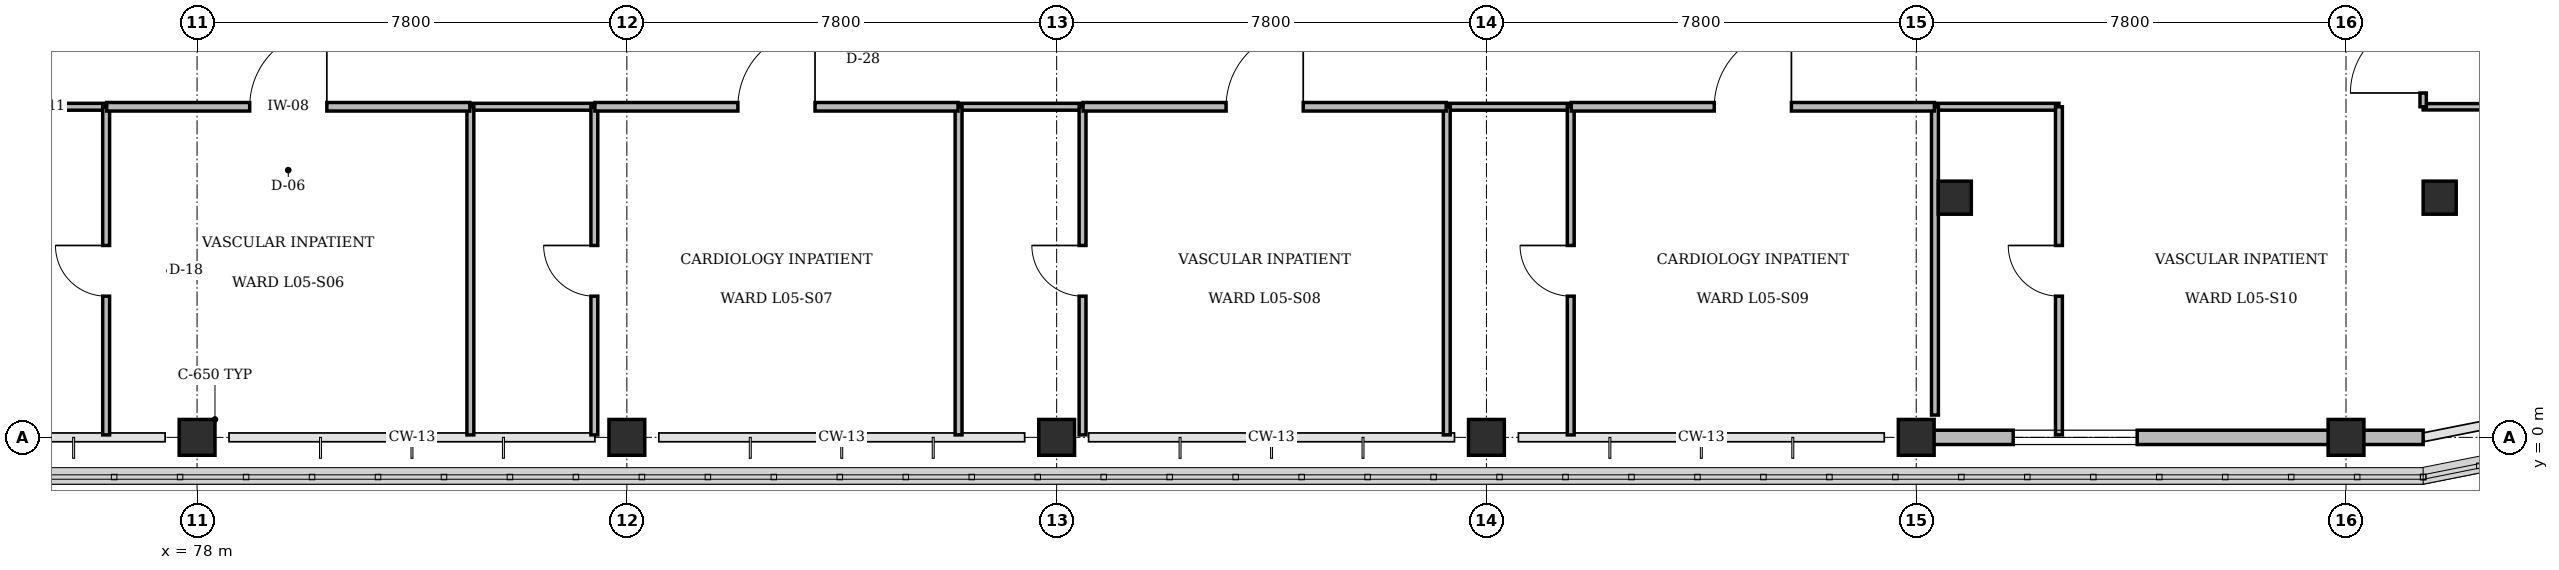
"""IFC4 building model, lengths in metres.
Left out: names, types, materials, properties, quantities, classifications, styles, units other than length and angle.
Written with IfcOpenShell. Run it as: python <this file> out.ifc"""

import sys

from ifc_helpers import new_model, si_unit, direction, frame, frame_2d, origin, origin_2d, place, context, subcontext, project, spatial, rectangle, circle, extrude, element, fill, save


model = new_model("IFC4")
c1 = context("Model", 3, precision=1e-05, world=origin(), true_north=direction((0.0, 1.0)))
c2 = subcontext(c1, "Body", "Model", "MODEL_VIEW")
j1 = project(units=[si_unit("LENGTHUNIT", "METRE"), si_unit("PLANEANGLEUNIT", "RADIAN")], contexts=[c1])
p1 = place(None, origin())
s1 = spatial("IfcSite", under=j1, at=p1, CompositionType="ELEMENT")
p2 = place(p1, origin())
s2 = spatial("IfcBuilding", under=s1, at=p2, CompositionType="ELEMENT")
p3 = place(p2, frame((0.0, 0.0, 22.2)))
s3 = spatial("IfcBuildingStorey", under=s2, at=p3, CompositionType="ELEMENT", Elevation=22.2)
for number, where, z_axis, x_axis in (
    (1, (78.0, 0.0, 0.0), (0.0, 0.0, 1.0), (1.0, 0.0, 0.0)),
    (2, (85.8, 0.0, 0.0), (0.0, 0.0, 1.0), (1.0, 0.0, 0.0)),
    (3, (93.6, 0.0, 0.0), (0.0, 0.0, 1.0), (1.0, 0.0, 0.0)),
    (4, (101.4, 0.0, 0.0), (0.0, 0.0, 1.0), (1.0, 0.0, 0.0)),
    (5, (109.2, 0.0, 0.0), (0.0, 0.0, 1.0), (1.0, 0.0, 0.0)),
    (6, (117.0, 0.0, 0.0), (0.0, 0.0, 1.0), (1.0, 0.0, 0.0)),
):
    element("IfcColumn", number, at=place(p3, frame(where, z_axis=z_axis, x_axis=x_axis)), inside=s3, PredefinedType="COLUMN", context=c2, shape_type="SweptSolid", body=[
        extrude(rectangle(XDim=0.65, YDim=0.65, at=origin_2d()), origin(), (0.0, 0.0, 1.0), 4.2),
    ])
for number, where, z_axis, x_axis in (
    (7, (118.7, 4.35, 0.0), (0.0, 0.0, 1.0), (1.0, 0.0, 0.0)),
    (8, (109.9, 4.35, 0.0), (0.0, 0.0, 1.0), (1.0, 0.0, 0.0)),
):
    element("IfcColumn", number, at=place(p3, frame(where, z_axis=z_axis, x_axis=x_axis)), inside=s3, PredefinedType="PILASTER", context=c2, shape_type="SweptSolid", body=[
        extrude(circle(Radius=0.3, at=origin_2d()), origin(), (0.0, 0.0, 1.0), 4.2),
    ])
p4 = place(p3, frame((118.4, 0.0, 0.0), z_axis=(0.0, 0.0, 1.0), x_axis=(-1.0, 0.0, 0.0)))
e9 = element("IfcWall", 9, at=p4, inside=s3, PredefinedType="STANDARD", context=c2, shape_type="SweptSolid", body=[
    extrude(rectangle(XDim=8.91, YDim=0.26, at=frame_2d((4.455, 0.0))), origin(), (0.0, 0.0, 1.0), 2.805),
])
p5 = place(p4, frame((5.19, 0.0, 0.85)))
e10 = element("IfcOpeningElement", 10, at=p5, cuts=e9, PredefinedType="OPENING", context=c2, shape_type="SweptSolid", body=[
    extrude(rectangle(XDim=2.25, YDim=1.45, at=frame_2d((1.125, 0.725))), frame((0.0, 0.14, 0.0), z_axis=(0.0, -1.0, 0.0), x_axis=(1.0, 0.0, 0.0)), (0.0, 0.0, 1.0), 0.28),
])
p6 = place(p3, frame((74.1, 6.0, 0.0), z_axis=(0.0, 0.0, 1.0), x_axis=(1.0, 0.0, 0.0)))
e11 = element("IfcWall", 11, at=p6, inside=s3, PredefinedType="PARTITIONING", context=c2, shape_type="SweptSolid", body=[
    extrude(rectangle(XDim=2.25, YDim=0.125, at=frame_2d((1.125, 0.0))), origin(), (0.0, 0.0, 1.0), 3.9),
])
p7 = place(p3, frame((76.35, 0.045, 0.0), z_axis=(0.0, 0.0, 1.0), x_axis=(0.0, 1.0, 0.0)))
e12 = element("IfcWall", 12, at=p7, inside=s3, PredefinedType="PARTITIONING", context=c2, shape_type="SweptSolid", body=[
    extrude(rectangle(XDim=5.955, YDim=0.125, at=frame_2d((2.978, 0.0))), origin(), (0.0, 0.0, 1.0), 3.9),
])
p8 = place(p7, frame((2.518, 0.0, 0.0)))
e13 = element("IfcOpeningElement", 13, at=p8, cuts=e12, PredefinedType="OPENING", context=c2, shape_type="SweptSolid", body=[
    extrude(rectangle(XDim=0.92, YDim=2.1, at=frame_2d((0.46, 1.05))), frame((0.0, 0.073, 0.0), z_axis=(0.0, -1.0, 0.0), x_axis=(1.0, 0.0, 0.0)), (0.0, 0.0, 1.0), 0.145),
])
p9 = place(p3, frame((82.96, 6.0, 0.0), z_axis=(0.0, 0.0, 1.0), x_axis=(1.0, 0.0, 0.0)))
e14 = element("IfcWall", 14, at=p9, inside=s3, PredefinedType="PARTITIONING", context=c2, shape_type="SweptSolid", body=[
    extrude(rectangle(XDim=2.25, YDim=0.125, at=frame_2d((1.125, 0.0))), origin(), (0.0, 0.0, 1.0), 3.9),
])
p10 = place(p3, frame((82.96, 0.045, 0.0), z_axis=(0.0, 0.0, 1.0), x_axis=(0.0, 1.0, 0.0)))
e15 = element("IfcWall", 15, at=p10, inside=s3, PredefinedType="PARTITIONING", context=c2, shape_type="SweptSolid", body=[
    extrude(rectangle(XDim=5.955, YDim=0.125, at=frame_2d((2.978, 0.0))), origin(), (0.0, 0.0, 1.0), 3.9),
])
p11 = place(p3, frame((85.21, 0.045, 0.0), z_axis=(0.0, 0.0, 1.0), x_axis=(0.0, 1.0, 0.0)))
e16 = element("IfcWall", 16, at=p11, inside=s3, PredefinedType="PARTITIONING", context=c2, shape_type="SweptSolid", body=[
    extrude(rectangle(XDim=5.955, YDim=0.125, at=frame_2d((2.978, 0.0))), origin(), (0.0, 0.0, 1.0), 3.9),
])
p12 = place(p11, frame((2.518, 0.0, 0.0)))
e17 = element("IfcOpeningElement", 17, at=p12, cuts=e16, PredefinedType="OPENING", context=c2, shape_type="SweptSolid", body=[
    extrude(rectangle(XDim=0.92, YDim=2.1, at=frame_2d((0.46, 1.05))), frame((0.0, 0.073, 0.0), z_axis=(0.0, -1.0, 0.0), x_axis=(1.0, 0.0, 0.0)), (0.0, 0.0, 1.0), 0.145),
])
p13 = place(p3, frame((91.82, 6.0, 0.0), z_axis=(0.0, 0.0, 1.0), x_axis=(1.0, 0.0, 0.0)))
e18 = element("IfcWall", 18, at=p13, inside=s3, PredefinedType="PARTITIONING", context=c2, shape_type="SweptSolid", body=[
    extrude(rectangle(XDim=2.25, YDim=0.125, at=frame_2d((1.125, 0.0))), origin(), (0.0, 0.0, 1.0), 3.9),
])
p14 = place(p3, frame((91.82, 0.045, 0.0), z_axis=(0.0, 0.0, 1.0), x_axis=(0.0, 1.0, 0.0)))
e19 = element("IfcWall", 19, at=p14, inside=s3, PredefinedType="PARTITIONING", context=c2, shape_type="SweptSolid", body=[
    extrude(rectangle(XDim=5.955, YDim=0.125, at=frame_2d((2.978, 0.0))), origin(), (0.0, 0.0, 1.0), 3.9),
])
p15 = place(p3, frame((94.07, 0.045, 0.0), z_axis=(0.0, 0.0, 1.0), x_axis=(0.0, 1.0, 0.0)))
e20 = element("IfcWall", 20, at=p15, inside=s3, PredefinedType="PARTITIONING", context=c2, shape_type="SweptSolid", body=[
    extrude(rectangle(XDim=5.955, YDim=0.125, at=frame_2d((2.978, 0.0))), origin(), (0.0, 0.0, 1.0), 3.27),
])
p16 = place(p15, frame((2.518, 0.0, 0.0)))
e21 = element("IfcOpeningElement", 21, at=p16, cuts=e20, PredefinedType="OPENING", context=c2, shape_type="SweptSolid", body=[
    extrude(rectangle(XDim=0.92, YDim=2.1, at=frame_2d((0.46, 1.05))), frame((0.0, 0.073, 0.0), z_axis=(0.0, -1.0, 0.0), x_axis=(1.0, 0.0, 0.0)), (0.0, 0.0, 1.0), 0.145),
])
p17 = place(p3, frame((100.68, 6.0, 0.0), z_axis=(0.0, 0.0, 1.0), x_axis=(1.0, 0.0, 0.0)))
e22 = element("IfcWall", 22, at=p17, inside=s3, PredefinedType="PARTITIONING", context=c2, shape_type="SweptSolid", body=[
    extrude(rectangle(XDim=2.25, YDim=0.125, at=frame_2d((1.125, 0.0))), origin(), (0.0, 0.0, 1.0), 3.9),
])
p18 = place(p3, frame((100.68, 0.045, 0.0), z_axis=(0.0, 0.0, 1.0), x_axis=(0.0, 1.0, 0.0)))
e23 = element("IfcWall", 23, at=p18, inside=s3, PredefinedType="PARTITIONING", context=c2, shape_type="SweptSolid", body=[
    extrude(rectangle(XDim=5.955, YDim=0.125, at=frame_2d((2.978, 0.0))), origin(), (0.0, 0.0, 1.0), 3.9),
])
p19 = place(p3, frame((102.93, 0.045, 0.0), z_axis=(0.0, 0.0, 1.0), x_axis=(0.0, 1.0, 0.0)))
e24 = element("IfcWall", 24, at=p19, inside=s3, PredefinedType="PARTITIONING", context=c2, shape_type="SweptSolid", body=[
    extrude(rectangle(XDim=5.955, YDim=0.125, at=frame_2d((2.978, 0.0))), origin(), (0.0, 0.0, 1.0), 3.9),
])
p20 = place(p19, frame((2.518, 0.0, 0.0)))
e25 = element("IfcOpeningElement", 25, at=p20, cuts=e24, PredefinedType="OPENING", context=c2, shape_type="SweptSolid", body=[
    extrude(rectangle(XDim=0.92, YDim=2.1, at=frame_2d((0.46, 1.05))), frame((0.0, 0.073, 0.0), z_axis=(0.0, -1.0, 0.0), x_axis=(1.0, 0.0, 0.0)), (0.0, 0.0, 1.0), 0.145),
])
p21 = place(p3, frame((109.54, 6.0, 0.0), z_axis=(0.0, 0.0, 1.0), x_axis=(1.0, 0.0, 0.0)))
e26 = element("IfcWall", 26, at=p21, inside=s3, PredefinedType="PARTITIONING", context=c2, shape_type="SweptSolid", body=[
    extrude(rectangle(XDim=2.25, YDim=0.125, at=frame_2d((1.125, 0.0))), origin(), (0.0, 0.0, 1.0), 3.9),
])
p22 = place(p3, frame((109.54, 0.405, 0.0), z_axis=(0.0, 0.0, 1.0), x_axis=(0.0, 1.0, 0.0)))
e27 = element("IfcWall", 27, at=p22, inside=s3, PredefinedType="PARTITIONING", context=c2, shape_type="SweptSolid", body=[
    extrude(rectangle(XDim=5.595, YDim=0.125, at=frame_2d((2.797, 0.0))), origin(), (0.0, 0.0, 1.0), 3.27),
])
p23 = place(p3, frame((111.79, 0.045, 0.0), z_axis=(0.0, 0.0, 1.0), x_axis=(0.0, 1.0, 0.0)))
e28 = element("IfcWall", 28, at=p23, inside=s3, PredefinedType="PARTITIONING", context=c2, shape_type="SweptSolid", body=[
    extrude(rectangle(XDim=5.955, YDim=0.125, at=frame_2d((2.978, 0.0))), origin(), (0.0, 0.0, 1.0), 3.9),
])
p24 = place(p23, frame((2.518, 0.0, 0.0)))
e29 = element("IfcOpeningElement", 29, at=p24, cuts=e28, PredefinedType="OPENING", context=c2, shape_type="SweptSolid", body=[
    extrude(rectangle(XDim=0.92, YDim=2.1, at=frame_2d((0.46, 1.05))), frame((0.0, 0.073, 0.0), z_axis=(0.0, -1.0, 0.0), x_axis=(1.0, 0.0, 0.0)), (0.0, 0.0, 1.0), 0.145),
])
p25 = place(p3, frame((118.4, 6.0, 0.0), z_axis=(0.0, 0.0, 1.0), x_axis=(1.0, 0.0, 0.0)))
e30 = element("IfcWall", 30, at=p25, inside=s3, PredefinedType="PARTITIONING", context=c2, shape_type="SweptSolid", body=[
    extrude(rectangle(XDim=12.1, YDim=0.115, at=frame_2d((6.05, 0.0))), origin(), (0.0, 0.0, 1.0), 3.9),
])
p26 = place(p3, frame((118.4, 6.0, 0.0), z_axis=(0.0, 0.0, 1.0), x_axis=(0.0, 1.0, 0.0)))
e31 = element("IfcWall", 31, at=p26, inside=s3, PredefinedType="PARTITIONING", context=c2, shape_type="SweptSolid", body=[
    extrude(rectangle(XDim=13.2, YDim=0.115, at=frame_2d((6.6, 0.0))), origin(), (0.0, 0.0, 1.0), 3.9),
])
p27 = place(p26, frame((0.25, 0.0, 0.0)))
e32 = element("IfcOpeningElement", 32, at=p27, cuts=e31, PredefinedType="OPENING", context=c2, shape_type="SweptSolid", body=[
    extrude(rectangle(XDim=1.32, YDim=2.15, at=frame_2d((0.66, 1.075))), frame((0.0, 0.067, 0.0), z_axis=(0.0, -1.0, 0.0), x_axis=(1.0, 0.0, 0.0)), (0.0, 0.0, 1.0), 0.135),
])
p28 = place(p3, frame((76.36, 6.0, 0.0), z_axis=(0.0, 0.0, 1.0), x_axis=(1.0, 0.0, 0.0)))
e33 = element("IfcWall", 33, at=p28, inside=s3, PredefinedType="PARTITIONING", context=c2, shape_type="SweptSolid", body=[
    extrude(rectangle(XDim=6.59, YDim=0.155, at=frame_2d((3.295, 0.0))), origin(), (0.0, 0.0, 1.0), 3.9),
])
p29 = place(p28, frame((2.595, 0.0, 0.0)))
e34 = element("IfcOpeningElement", 34, at=p29, cuts=e33, PredefinedType="OPENING", context=c2, shape_type="SweptSolid", body=[
    extrude(rectangle(XDim=1.4, YDim=2.2, at=frame_2d((0.7, 1.1))), frame((0.0, 0.087, 0.0), z_axis=(0.0, -1.0, 0.0), x_axis=(1.0, 0.0, 0.0)), (0.0, 0.0, 1.0), 0.175),
])
p30 = place(p3, frame((85.22, 6.0, 0.0), z_axis=(0.0, 0.0, 1.0), x_axis=(1.0, 0.0, 0.0)))
e35 = element("IfcWall", 35, at=p30, inside=s3, PredefinedType="PARTITIONING", context=c2, shape_type="SweptSolid", body=[
    extrude(rectangle(XDim=6.59, YDim=0.155, at=frame_2d((3.295, 0.0))), origin(), (0.0, 0.0, 1.0), 3.9),
])
p31 = place(p30, frame((2.595, 0.0, 0.0)))
e36 = element("IfcOpeningElement", 36, at=p31, cuts=e35, PredefinedType="OPENING", context=c2, shape_type="SweptSolid", body=[
    extrude(rectangle(XDim=1.4, YDim=2.2, at=frame_2d((0.7, 1.1))), frame((0.0, 0.087, 0.0), z_axis=(0.0, -1.0, 0.0), x_axis=(1.0, 0.0, 0.0)), (0.0, 0.0, 1.0), 0.175),
])
p32 = place(p3, frame((94.08, 6.0, 0.0), z_axis=(0.0, 0.0, 1.0), x_axis=(1.0, 0.0, 0.0)))
e37 = element("IfcWall", 37, at=p32, inside=s3, PredefinedType="PARTITIONING", context=c2, shape_type="SweptSolid", body=[
    extrude(rectangle(XDim=6.59, YDim=0.155, at=frame_2d((3.295, 0.0))), origin(), (0.0, 0.0, 1.0), 3.9),
])
p33 = place(p32, frame((2.595, 0.0, 0.0)))
e38 = element("IfcOpeningElement", 38, at=p33, cuts=e37, PredefinedType="OPENING", context=c2, shape_type="SweptSolid", body=[
    extrude(rectangle(XDim=1.4, YDim=2.2, at=frame_2d((0.7, 1.1))), frame((0.0, 0.087, 0.0), z_axis=(0.0, -1.0, 0.0), x_axis=(1.0, 0.0, 0.0)), (0.0, 0.0, 1.0), 0.175),
])
p34 = place(p3, frame((102.94, 6.0, 0.0), z_axis=(0.0, 0.0, 1.0), x_axis=(1.0, 0.0, 0.0)))
e39 = element("IfcWall", 39, at=p34, inside=s3, PredefinedType="PARTITIONING", context=c2, shape_type="SweptSolid", body=[
    extrude(rectangle(XDim=6.59, YDim=0.155, at=frame_2d((3.295, 0.0))), origin(), (0.0, 0.0, 1.0), 3.9),
])
p35 = place(p34, frame((2.595, 0.0, 0.0)))
e40 = element("IfcOpeningElement", 40, at=p35, cuts=e39, PredefinedType="OPENING", context=c2, shape_type="SweptSolid", body=[
    extrude(rectangle(XDim=1.4, YDim=2.2, at=frame_2d((0.7, 1.1))), frame((0.0, 0.087, 0.0), z_axis=(0.0, -1.0, 0.0), x_axis=(1.0, 0.0, 0.0)), (0.0, 0.0, 1.0), 0.175),
])
p36 = place(p5, origin())
e41 = element("IfcWindow", 41, at=p36, inside=s3, PartitioningType="SINGLE_PANEL", PredefinedType="WINDOW", context=c2, shape_type="SweptSolid", body=[
    extrude(rectangle(XDim=2.25, YDim=1.45, at=frame_2d((1.125, 0.725))), frame((0.0, 0.03, 0.0), z_axis=(0.0, -1.0, 0.0), x_axis=(1.0, 0.0, 0.0)), (0.0, 0.0, 1.0), 0.06),
])
fill(e10, e41)
p37 = place(p8, origin())
e42 = element("IfcDoor", 42, at=p37, inside=s3, OperationType="SINGLE_SWING_RIGHT", PredefinedType="DOOR", context=c2, shape_type="SweptSolid", body=[
    extrude(rectangle(XDim=0.92, YDim=2.1, at=frame_2d((0.46, 1.05))), frame((0.0, 0.025, 0.0), z_axis=(0.0, -1.0, 0.0), x_axis=(1.0, 0.0, 0.0)), (0.0, 0.0, 1.0), 0.05),
])
fill(e13, e42)
p38 = place(p12, origin())
e43 = element("IfcDoor", 43, at=p38, inside=s3, OperationType="SINGLE_SWING_RIGHT", PredefinedType="DOOR", context=c2, shape_type="SweptSolid", body=[
    extrude(rectangle(XDim=0.92, YDim=2.1, at=frame_2d((0.46, 1.05))), frame((0.0, 0.025, 0.0), z_axis=(0.0, -1.0, 0.0), x_axis=(1.0, 0.0, 0.0)), (0.0, 0.0, 1.0), 0.05),
])
fill(e17, e43)
p39 = place(p16, origin())
e44 = element("IfcDoor", 44, at=p39, inside=s3, OperationType="SINGLE_SWING_RIGHT", PredefinedType="DOOR", context=c2, shape_type="SweptSolid", body=[
    extrude(rectangle(XDim=0.92, YDim=2.1, at=frame_2d((0.46, 1.05))), frame((0.0, 0.025, 0.0), z_axis=(0.0, -1.0, 0.0), x_axis=(1.0, 0.0, 0.0)), (0.0, 0.0, 1.0), 0.05),
])
fill(e21, e44)
p40 = place(p20, origin())
e45 = element("IfcDoor", 45, at=p40, inside=s3, OperationType="SINGLE_SWING_RIGHT", PredefinedType="DOOR", context=c2, shape_type="SweptSolid", body=[
    extrude(rectangle(XDim=0.92, YDim=2.1, at=frame_2d((0.46, 1.05))), frame((0.0, 0.025, 0.0), z_axis=(0.0, -1.0, 0.0), x_axis=(1.0, 0.0, 0.0)), (0.0, 0.0, 1.0), 0.05),
])
fill(e25, e45)
p41 = place(p24, origin())
e46 = element("IfcDoor", 46, at=p41, inside=s3, OperationType="SINGLE_SWING_RIGHT", PredefinedType="DOOR", context=c2, shape_type="SweptSolid", body=[
    extrude(rectangle(XDim=0.92, YDim=2.1, at=frame_2d((0.46, 1.05))), frame((0.0, 0.025, 0.0), z_axis=(0.0, -1.0, 0.0), x_axis=(1.0, 0.0, 0.0)), (0.0, 0.0, 1.0), 0.05),
])
fill(e29, e46)
p42 = place(p27, origin())
e47 = element("IfcDoor", 47, at=p42, inside=s3, OperationType="SINGLE_SWING_LEFT", PredefinedType="DOOR", context=c2, shape_type="SweptSolid", body=[
    extrude(rectangle(XDim=1.32, YDim=2.15, at=frame_2d((0.66, 1.075))), frame((0.0, 0.025, 0.0), z_axis=(0.0, -1.0, 0.0), x_axis=(1.0, 0.0, 0.0)), (0.0, 0.0, 1.0), 0.05),
])
fill(e32, e47)
p43 = place(p29, origin())
e48 = element("IfcDoor", 48, at=p43, inside=s3, OperationType="SINGLE_SWING_RIGHT", PredefinedType="DOOR", context=c2, shape_type="SweptSolid", body=[
    extrude(rectangle(XDim=1.4, YDim=2.2, at=frame_2d((0.7, 1.1))), frame((0.0, 0.025, 0.0), z_axis=(0.0, -1.0, 0.0), x_axis=(1.0, 0.0, 0.0)), (0.0, 0.0, 1.0), 0.05),
])
fill(e34, e48)
p44 = place(p31, origin())
e49 = element("IfcDoor", 49, at=p44, inside=s3, OperationType="SINGLE_SWING_RIGHT", PredefinedType="DOOR", context=c2, shape_type="SweptSolid", body=[
    extrude(rectangle(XDim=1.4, YDim=2.2, at=frame_2d((0.7, 1.1))), frame((0.0, 0.025, 0.0), z_axis=(0.0, -1.0, 0.0), x_axis=(1.0, 0.0, 0.0)), (0.0, 0.0, 1.0), 0.05),
])
fill(e36, e49)
p45 = place(p33, origin())
e50 = element("IfcDoor", 50, at=p45, inside=s3, OperationType="SINGLE_SWING_RIGHT", PredefinedType="DOOR", context=c2, shape_type="SweptSolid", body=[
    extrude(rectangle(XDim=1.4, YDim=2.2, at=frame_2d((0.7, 1.1))), frame((0.0, 0.025, 0.0), z_axis=(0.0, -1.0, 0.0), x_axis=(1.0, 0.0, 0.0)), (0.0, 0.0, 1.0), 0.05),
])
fill(e38, e50)
p46 = place(p35, origin())
e51 = element("IfcDoor", 51, at=p46, inside=s3, OperationType="SINGLE_SWING_RIGHT", PredefinedType="DOOR", context=c2, shape_type="SweptSolid", body=[
    extrude(rectangle(XDim=1.4, YDim=2.2, at=frame_2d((0.7, 1.1))), frame((0.0, 0.025, 0.0), z_axis=(0.0, -1.0, 0.0), x_axis=(1.0, 0.0, 0.0)), (0.0, 0.0, 1.0), 0.05),
])
fill(e40, e51)
save(model, sys.argv[1])
